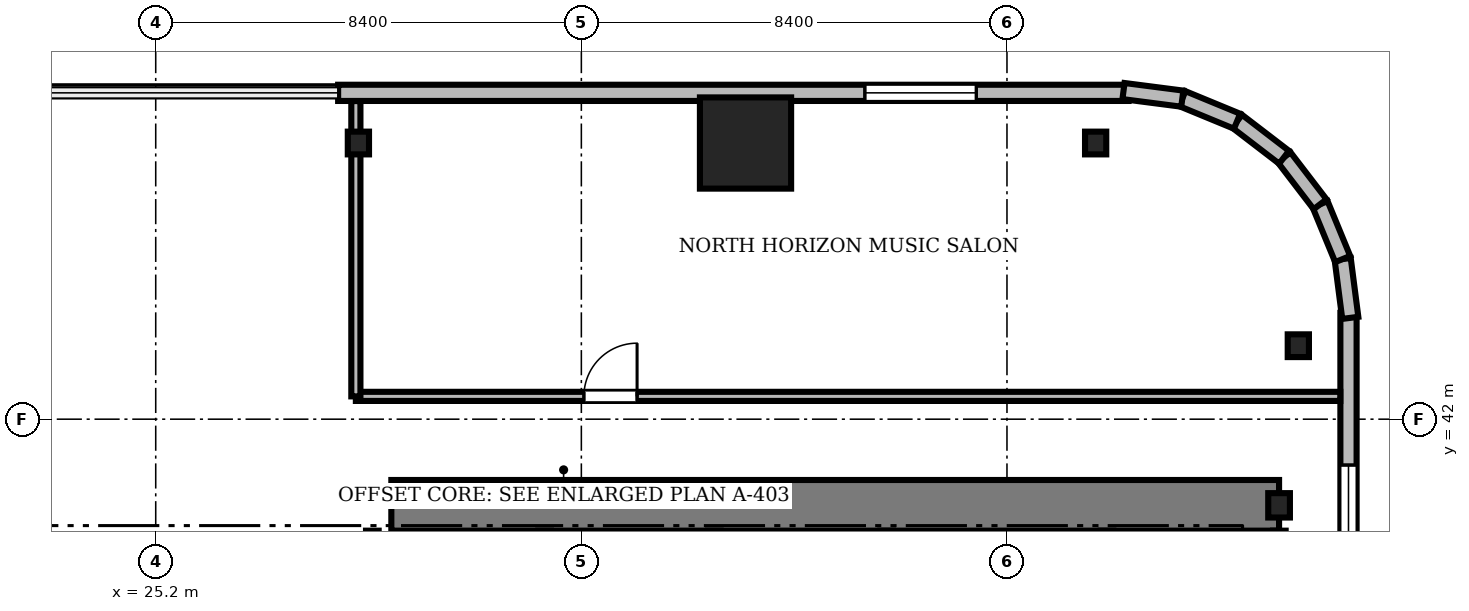
"""IFC4 building model, lengths in metres.
Left out: names, types, materials, properties, quantities, classifications, styles, units other than length and angle.
Written with IfcOpenShell. Run it as: python <this file> out.ifc"""

import sys

from ifc_helpers import new_model, si_unit, direction, frame, frame_2d, origin, origin_2d, place, context, subcontext, project, spatial, rectangle, i_section, extrude, source, transform, mapped, element, fill, save


model = new_model("IFC4")
c1 = context("Model", 3, precision=1e-05, world=origin(), true_north=direction((0.0, 1.0)))
c2 = subcontext(c1, "Body", "Model", "MODEL_VIEW")
j1 = project(units=[si_unit("LENGTHUNIT", "METRE"), si_unit("PLANEANGLEUNIT", "RADIAN")], contexts=[c1])
p1 = place(None, origin())
s1 = spatial("IfcSite", under=j1, at=p1, CompositionType="ELEMENT")
p2 = place(p1, origin())
s2 = spatial("IfcBuilding", under=s1, at=p2, CompositionType="ELEMENT")
p3 = place(p2, frame((0.0, 0.0, 38.55)))
s3 = spatial("IfcBuildingStorey", under=s2, at=p3, CompositionType="ELEMENT", Elevation=38.55)
m1 = source(origin(), c2, "Body", "SweptSolid", [
    extrude(rectangle(XDim=17.52, YDim=1.0, at=frame_2d((8.76, 0.0))), origin(), (0.0, 0.0, 1.0), 3.41),
])
p4 = place(p3, frame((29.85, 40.3, 0.0), z_axis=(0.0, 0.0, 1.0), x_axis=(1.0, 0.0, 0.0)))
e1 = element("IfcWall", 1, at=p4, inside=s3, PredefinedType="SHEAR", context=c2, shape_type="MappedRepresentation", body=[
    mapped(m1, transform((0.0, 0.0, 0.0), scale=1.0)),
])
m2 = source(origin(), c2, "Body", "SweptSolid", [
    extrude(i_section(OverallWidth=0.428, OverallDepth=0.481, WebThickness=0.04, FlangeThickness=0.063, FilletRadius=0.015, at=origin_2d()), origin(), (0.0, 0.0, 1.0), 3.41),
])
p5 = place(p3, frame((47.37, 40.3, 0.0), z_axis=(0.0, 0.0, 1.0), x_axis=(1.0, 0.0, 0.0)))
e2 = element("IfcColumn", 2, at=p5, inside=s3, PredefinedType="COLUMN", context=c2, shape_type="MappedRepresentation", body=[
    mapped(m2, transform((0.0, 0.0, 0.0), scale=1.0)),
])
m3 = source(origin(), c2, "Body", "SweptSolid", [
    extrude(rectangle(XDim=1.8, YDim=1.8, at=origin_2d()), origin(), (0.0, 0.0, 1.0), 3.41),
])
p6 = place(p3, frame((36.84, 47.45, 0.0), z_axis=(0.0, 0.0, 1.0), x_axis=(1.0, 0.0, 0.0)))
e3 = element("IfcColumn", 3, at=p6, inside=s3, PredefinedType="COLUMN", context=c2, shape_type="MappedRepresentation", body=[
    mapped(m3, transform((0.0, 0.0, 0.0), scale=1.0)),
])
m4 = source(origin(), c2, "Body", "SweptSolid", [
    extrude(i_section(OverallWidth=0.419, OverallDepth=0.449, WebThickness=0.031, FlangeThickness=0.048, FilletRadius=0.015, at=origin_2d()), origin(), (0.0, 0.0, 1.0), 3.41),
])
for number, where, z_axis, x_axis in (
    (4, (47.75, 43.45, 0.0), (0.0, 0.0, 1.0), (1.0, 0.0, 0.0)),
    (5, (43.75, 47.45, 0.0), (0.0, 0.0, 1.0), (1.0, 0.0, 0.0)),
    (6, (29.2, 47.45, 0.0), (0.0, 0.0, 1.0), (1.0, 0.0, 0.0)),
):
    element("IfcColumn", number, at=place(p3, frame(where, z_axis=z_axis, x_axis=x_axis)), inside=s3, PredefinedType="COLUMN", context=c2, shape_type="MappedRepresentation", body=[
        mapped(m4, transform((0.0, 0.0, 0.0), scale=1.0)),
    ])
m5 = source(origin(), c2, "Body", "SweptSolid", [
    extrude(rectangle(XDim=15.6, YDim=0.32, at=frame_2d((7.8, 0.0))), origin(), (0.0, 0.0, 1.0), 3.41),
])
p7 = place(p3, frame((44.4, 48.44, 0.0), z_axis=(0.0, 0.0, 1.0), x_axis=(-1.0, 0.0, 0.0)))
e7 = element("IfcWall", 7, at=p7, inside=s3, PredefinedType="SOLIDWALL", context=c2, shape_type="MappedRepresentation", body=[
    mapped(m5, transform((0.0, 0.0, 0.0), scale=1.0)),
])
m6 = source(origin(), c2, "Body", "SweptSolid", [
    extrude(rectangle(XDim=2.2, YDim=2.4, at=frame_2d((1.1, 1.2))), frame((0.0, 0.17, 0.0), z_axis=(0.0, -1.0, 0.0), x_axis=(1.0, 0.0, 0.0)), (0.0, 0.0, 1.0), 0.34),
])
p8 = place(p7, frame((3.005, 0.0, 0.72)))
e8 = element("IfcOpeningElement", 8, at=p8, cuts=e7, PredefinedType="OPENING", context=c2, shape_type="MappedRepresentation", body=[
    mapped(m6, transform((0.0, 0.0, 0.0), scale=1.0)),
])
m7 = source(origin(), c2, "Body", "SweptSolid", [
    extrude(rectangle(XDim=15.6, YDim=0.32, at=frame_2d((7.8, 0.0))), origin(), (0.0, 0.0, 1.0), 3.41),
])
p9 = place(p3, frame((48.74, 28.5, 0.0), z_axis=(0.0, 0.0, 1.0), x_axis=(0.0, 1.0, 0.0)))
e9 = element("IfcWall", 9, at=p9, inside=s3, PredefinedType="SOLIDWALL", context=c2, shape_type="MappedRepresentation", body=[
    mapped(m7, transform((0.0, 0.0, 0.0), scale=1.0)),
])
p10 = place(p9, frame((10.395, 0.0, 0.72)))
e10 = element("IfcOpeningElement", 10, at=p10, cuts=e9, PredefinedType="OPENING", context=c2, shape_type="MappedRepresentation", body=[
    mapped(m6, transform((0.0, 0.0, 0.0), scale=1.0)),
])
m8 = source(origin(), c2, "Body", "SweptSolid", [
    extrude(rectangle(XDim=1.17, YDim=0.32, at=frame_2d((0.585, 0.0))), origin(), (0.0, 0.0, 1.0), 3.41),
])
p11 = place(p3, frame((48.776, 44.0, 0.0), z_axis=(0.0, 0.0, 1.0), x_axis=(-0.128295670475, 0.991735963317, 0.0)))
e11 = element("IfcWall", 11, at=p11, inside=s3, PredefinedType="SOLIDWALL", context=c2, shape_type="MappedRepresentation", body=[
    mapped(m8, transform((0.0, 0.0, 0.0), scale=1.0)),
])
m9 = source(origin(), c2, "Body", "SweptSolid", [
    extrude(rectangle(XDim=1.169, YDim=0.32, at=frame_2d((0.584, 0.0))), origin(), (0.0, 0.0, 1.0), 3.41),
])
p12 = place(p3, frame((48.625, 45.16, 0.0), z_axis=(0.0, 0.0, 1.0), x_axis=(-0.381054331552, 0.924552646638, 0.0)))
e12 = element("IfcWall", 12, at=p12, inside=s3, PredefinedType="SOLIDWALL", context=c2, shape_type="MappedRepresentation", body=[
    mapped(m9, transform((0.0, 0.0, 0.0), scale=1.0)),
])
m10 = source(origin(), c2, "Body", "SweptSolid", [
    extrude(rectangle(XDim=1.169, YDim=0.32, at=frame_2d((0.584, 0.0))), origin(), (0.0, 0.0, 1.0), 3.41),
])
p13 = place(p3, frame((48.18, 46.241, 0.0), z_axis=(0.0, 0.0, 1.0), x_axis=(-0.608387696831, 0.793639975269, 0.0)))
e13 = element("IfcWall", 13, at=p13, inside=s3, PredefinedType="SOLIDWALL", context=c2, shape_type="MappedRepresentation", body=[
    mapped(m10, transform((0.0, 0.0, 0.0), scale=1.0)),
])
m11 = source(origin(), c2, "Body", "SweptSolid", [
    extrude(rectangle(XDim=1.169, YDim=0.32, at=frame_2d((0.584, 0.0))), origin(), (0.0, 0.0, 1.0), 3.41),
])
p14 = place(p3, frame((47.469, 47.169, 0.0), z_axis=(0.0, 0.0, 1.0), x_axis=(-0.793663520347, 0.608356981114, 0.0)))
e14 = element("IfcWall", 14, at=p14, inside=s3, PredefinedType="SOLIDWALL", context=c2, shape_type="MappedRepresentation", body=[
    mapped(m11, transform((0.0, 0.0, 0.0), scale=1.0)),
])
p15 = place(p3, frame((46.541, 47.88, 0.0), z_axis=(0.0, 0.0, 1.0), x_axis=(-0.924552646638, 0.381054331552, 0.0)))
e15 = element("IfcWall", 15, at=p15, inside=s3, PredefinedType="SOLIDWALL", context=c2, shape_type="MappedRepresentation", body=[
    mapped(m9, transform((0.0, 0.0, 0.0), scale=1.0)),
])
p16 = place(p3, frame((45.46, 48.325, 0.0), z_axis=(0.0, 0.0, 1.0), x_axis=(-0.991735963317, 0.128295670475, 0.0)))
e16 = element("IfcWall", 16, at=p16, inside=s3, PredefinedType="SOLIDWALL", context=c2, shape_type="MappedRepresentation", body=[
    mapped(m8, transform((0.0, 0.0, 0.0), scale=1.0)),
])
m12 = source(origin(), c2, "Body", "SweptSolid", [
    extrude(rectangle(XDim=9.15, YDim=0.25, at=frame_2d((4.575, 0.0))), origin(), (0.0, 0.0, 1.0), 3.45),
])
for number, where, z_axis, x_axis in (
    (17, (29.475, 30.65, 0.0), (0.0, 0.0, 1.0), (0.0, 1.0, 0.0)),
    (18, (32.875, 30.65, 0.0), (0.0, 0.0, 1.0), (0.0, 1.0, 0.0)),
    (19, (36.225, 30.65, 0.0), (0.0, 0.0, 1.0), (0.0, 1.0, 0.0)),
    (20, (39.625, 30.65, 0.0), (0.0, 0.0, 1.0), (0.0, 1.0, 0.0)),
    (21, (43.975, 30.65, 0.0), (0.0, 0.0, 1.0), (0.0, 1.0, 0.0)),
    (22, (47.375, 30.65, 0.0), (0.0, 0.0, 1.0), (0.0, 1.0, 0.0)),
):
    element("IfcWall", number, at=place(p3, frame(where, z_axis=z_axis, x_axis=x_axis)), inside=s3, PredefinedType="SOLIDWALL", context=c2, shape_type="MappedRepresentation", body=[
        mapped(m12, transform((0.0, 0.0, 0.0), scale=1.0)),
    ])
m13 = source(origin(), c2, "Body", "SweptSolid", [
    extrude(rectangle(XDim=19.428, YDim=0.18, at=frame_2d((9.714, 0.0))), origin(), (0.0, 0.0, 1.0), 2.652),
])
p17 = place(p3, frame((29.15, 42.45, 0.0), z_axis=(0.0, 0.0, 1.0), x_axis=(1.0, 0.0, 0.0)))
e23 = element("IfcWall", 23, at=p17, inside=s3, PredefinedType="PARTITIONING", context=c2, shape_type="MappedRepresentation", body=[
    mapped(m13, transform((0.0, 0.0, 0.0), scale=1.0)),
])
m14 = source(origin(), c2, "Body", "SweptSolid", [
    extrude(rectangle(XDim=1.05, YDim=2.2, at=frame_2d((0.525, 1.1))), frame((0.0, 0.1, 0.0), z_axis=(0.0, -1.0, 0.0), x_axis=(1.0, 0.0, 0.0)), (0.0, 0.0, 1.0), 0.2),
])
p18 = place(p17, frame((4.5, 0.0, 0.0)))
e24 = element("IfcOpeningElement", 24, at=p18, cuts=e23, PredefinedType="OPENING", context=c2, shape_type="MappedRepresentation", body=[
    mapped(m14, transform((0.0, 0.0, 0.0), scale=1.0)),
])
m15 = source(origin(), c2, "Body", "SweptSolid", [
    extrude(rectangle(XDim=5.828, YDim=0.18, at=frame_2d((2.914, 0.0))), origin(), (0.0, 0.0, 1.0), 2.652),
])
p19 = place(p3, frame((29.15, 42.45, 0.0), z_axis=(0.0, 0.0, 1.0), x_axis=(0.0, 1.0, 0.0)))
e25 = element("IfcWall", 25, at=p19, inside=s3, PredefinedType="PARTITIONING", context=c2, shape_type="MappedRepresentation", body=[
    mapped(m15, transform((0.0, 0.0, 0.0), scale=1.0)),
])
m16 = source(origin(), c2, "Body", "SweptSolid", [
    extrude(rectangle(XDim=2.2, YDim=2.4, at=frame_2d((1.1, 1.2))), frame((0.0, 0.03, 0.0), z_axis=(0.0, -1.0, 0.0), x_axis=(1.0, 0.0, 0.0)), (0.0, 0.0, 1.0), 0.06),
])
p20 = place(p8, origin())
e26 = element("IfcWindow", 26, at=p20, inside=s3, PartitioningType="SINGLE_PANEL", PredefinedType="WINDOW", context=c2, shape_type="MappedRepresentation", body=[
    mapped(m16, transform((0.0, 0.0, 0.0), scale=1.0)),
])
fill(e8, e26)
p21 = place(p10, origin())
e27 = element("IfcWindow", 27, at=p21, inside=s3, PartitioningType="SINGLE_PANEL", PredefinedType="WINDOW", context=c2, shape_type="MappedRepresentation", body=[
    mapped(m16, transform((0.0, 0.0, 0.0), scale=1.0)),
])
fill(e10, e27)
m17 = source(origin(), c2, "Body", "SweptSolid", [
    extrude(rectangle(XDim=1.05, YDim=2.2, at=frame_2d((0.525, 1.1))), frame((0.0, 0.025, 0.0), z_axis=(0.0, -1.0, 0.0), x_axis=(1.0, 0.0, 0.0)), (0.0, 0.0, 1.0), 0.05),
])
p22 = place(p18, origin())
e28 = element("IfcDoor", 28, at=p22, inside=s3, OperationType="SINGLE_SWING_RIGHT", PredefinedType="DOOR", context=c2, shape_type="MappedRepresentation", body=[
    mapped(m17, transform((0.0, 0.0, 0.0), scale=1.0)),
])
fill(e24, e28)
save(model, sys.argv[1])
